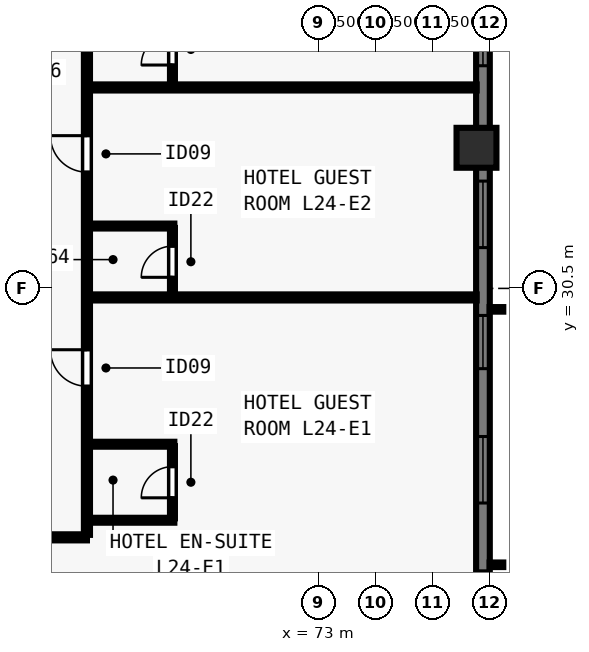
"""IFC4 building model, lengths in metres.
Left out: names, types, materials, properties, quantities, classifications, styles, units other than length and angle.
Written with IfcOpenShell. Run it as: python <this file> out.ifc"""

import sys

from ifc_helpers import new_model, si_unit, direction, frame, frame_2d, origin, origin_2d, place, context, subcontext, project, spatial, rectangle, extrude, element, fill, save


model = new_model("IFC4")
c1 = context("Model", 3, precision=1e-05, world=origin(), true_north=direction((0.0, 1.0)))
c2 = subcontext(c1, "Body", "Model", "MODEL_VIEW")
j1 = project(units=[si_unit("LENGTHUNIT", "METRE"), si_unit("PLANEANGLEUNIT", "RADIAN")], contexts=[c1])
p1 = place(None, origin())
s1 = spatial("IfcSite", under=j1, at=p1, CompositionType="ELEMENT")
p2 = place(p1, origin())
s2 = spatial("IfcBuilding", under=s1, at=p2, CompositionType="ELEMENT")
p3 = place(p2, frame((0.0, 0.0, 90.0)))
s3 = spatial("IfcBuildingStorey", under=s2, at=p3, CompositionType="ELEMENT", Elevation=90.0)
p4 = place(p3, frame((77.15, 34.2, 0.0), z_axis=(0.0, 0.0, 1.0), x_axis=(0.0, 1.0, 0.0)))
e1 = element("IfcColumn", 1, at=p4, inside=s3, PredefinedType="COLUMN", context=c2, shape_type="SweptSolid", body=[
    extrude(rectangle(XDim=1.05, YDim=1.05, at=origin_2d()), origin(), (0.0, 0.0, 1.0), 3.5),
])
p5 = place(p3, frame((77.32, 61.5, 0.0), z_axis=(0.0, 0.0, 1.0), x_axis=(0.0, -1.0, 0.0)))
e2 = element("IfcWall", 2, at=p5, inside=s3, PredefinedType="SOLIDWALL", context=c2, shape_type="SweptSolid", body=[
    extrude(rectangle(XDim=44.662, YDim=0.36, at=frame_2d((22.331, 0.0))), origin(), (0.0, 0.0, 1.0), 3.28),
])
p6 = place(p5, frame((5.68, 0.0, 0.8)))
e3 = element("IfcOpeningElement", 3, at=p6, cuts=e2, PredefinedType="OPENING", context=c2, shape_type="SweptSolid", body=[
    extrude(rectangle(XDim=1.4, YDim=1.544, at=frame_2d((0.7, 0.772))), frame((0.0, 0.19, 0.0), z_axis=(0.0, -1.0, 0.0), x_axis=(1.0, 0.0, 0.0)), (0.0, 0.0, 1.0), 0.38),
])
p7 = place(p5, frame((8.015, 0.0, 0.8)))
e4 = element("IfcOpeningElement", 4, at=p7, cuts=e2, PredefinedType="OPENING", context=c2, shape_type="SweptSolid", body=[
    extrude(rectangle(XDim=1.75, YDim=1.544, at=frame_2d((0.875, 0.772))), frame((0.0, 0.19, 0.0), z_axis=(0.0, -1.0, 0.0), x_axis=(1.0, 0.0, 0.0)), (0.0, 0.0, 1.0), 0.38),
])
p8 = place(p5, frame((11.551, 0.0, 0.8)))
e5 = element("IfcOpeningElement", 5, at=p8, cuts=e2, PredefinedType="OPENING", context=c2, shape_type="SweptSolid", body=[
    extrude(rectangle(XDim=1.4, YDim=1.544, at=frame_2d((0.7, 0.772))), frame((0.0, 0.19, 0.0), z_axis=(0.0, -1.0, 0.0), x_axis=(1.0, 0.0, 0.0)), (0.0, 0.0, 1.0), 0.38),
])
p9 = place(p5, frame((14.736, 0.0, 0.8)))
e6 = element("IfcOpeningElement", 6, at=p9, cuts=e2, PredefinedType="OPENING", context=c2, shape_type="SweptSolid", body=[
    extrude(rectangle(XDim=1.75, YDim=1.544, at=frame_2d((0.875, 0.772))), frame((0.0, 0.19, 0.0), z_axis=(0.0, -1.0, 0.0), x_axis=(1.0, 0.0, 0.0)), (0.0, 0.0, 1.0), 0.38),
])
p10 = place(p5, frame((19.521, 0.0, 0.8)))
e7 = element("IfcOpeningElement", 7, at=p10, cuts=e2, PredefinedType="OPENING", context=c2, shape_type="SweptSolid", body=[
    extrude(rectangle(XDim=1.4, YDim=1.544, at=frame_2d((0.7, 0.772))), frame((0.0, 0.19, 0.0), z_axis=(0.0, -1.0, 0.0), x_axis=(1.0, 0.0, 0.0)), (0.0, 0.0, 1.0), 0.38),
])
p11 = place(p5, frame((21.456, 0.0, 0.8)))
e8 = element("IfcOpeningElement", 8, at=p11, cuts=e2, PredefinedType="OPENING", context=c2, shape_type="SweptSolid", body=[
    extrude(rectangle(XDim=1.75, YDim=1.544, at=frame_2d((0.875, 0.772))), frame((0.0, 0.19, 0.0), z_axis=(0.0, -1.0, 0.0), x_axis=(1.0, 0.0, 0.0)), (0.0, 0.0, 1.0), 0.38),
])
p12 = place(p5, frame((23.741, 0.0, 0.8)))
e9 = element("IfcOpeningElement", 9, at=p12, cuts=e2, PredefinedType="OPENING", context=c2, shape_type="SweptSolid", body=[
    extrude(rectangle(XDim=1.4, YDim=1.544, at=frame_2d((0.7, 0.772))), frame((0.0, 0.19, 0.0), z_axis=(0.0, -1.0, 0.0), x_axis=(1.0, 0.0, 0.0)), (0.0, 0.0, 1.0), 0.38),
])
p13 = place(p5, frame((28.177, 0.0, 0.8)))
e10 = element("IfcOpeningElement", 10, at=p13, cuts=e2, PredefinedType="OPENING", context=c2, shape_type="SweptSolid", body=[
    extrude(rectangle(XDim=1.75, YDim=1.544, at=frame_2d((0.875, 0.772))), frame((0.0, 0.19, 0.0), z_axis=(0.0, -1.0, 0.0), x_axis=(1.0, 0.0, 0.0)), (0.0, 0.0, 1.0), 0.38),
])
p14 = place(p5, frame((31.711, 0.0, 0.8)))
e11 = element("IfcOpeningElement", 11, at=p14, cuts=e2, PredefinedType="OPENING", context=c2, shape_type="SweptSolid", body=[
    extrude(rectangle(XDim=1.4, YDim=1.544, at=frame_2d((0.7, 0.772))), frame((0.0, 0.19, 0.0), z_axis=(0.0, -1.0, 0.0), x_axis=(1.0, 0.0, 0.0)), (0.0, 0.0, 1.0), 0.38),
])
p15 = place(p5, frame((34.897, 0.0, 0.8)))
e12 = element("IfcOpeningElement", 12, at=p15, cuts=e2, PredefinedType="OPENING", context=c2, shape_type="SweptSolid", body=[
    extrude(rectangle(XDim=1.75, YDim=1.544, at=frame_2d((0.875, 0.772))), frame((0.0, 0.19, 0.0), z_axis=(0.0, -1.0, 0.0), x_axis=(1.0, 0.0, 0.0)), (0.0, 0.0, 1.0), 0.38),
])
p16 = place(p5, frame((38.432, 0.0, 0.8)))
e13 = element("IfcOpeningElement", 13, at=p16, cuts=e2, PredefinedType="OPENING", context=c2, shape_type="SweptSolid", body=[
    extrude(rectangle(XDim=1.4, YDim=1.544, at=frame_2d((0.7, 0.772))), frame((0.0, 0.19, 0.0), z_axis=(0.0, -1.0, 0.0), x_axis=(1.0, 0.0, 0.0)), (0.0, 0.0, 1.0), 0.38),
])
p17 = place(p3, frame((37.1, 23.95, 0.0), z_axis=(0.0, 0.0, 1.0), x_axis=(1.0, 0.0, 0.0)))
e14 = element("IfcWall", 14, at=p17, inside=s3, PredefinedType="PARTITIONING", context=c2, shape_type="SweptSolid", body=[
    extrude(rectangle(XDim=29.8, YDim=0.16, at=frame_2d((14.9, 0.0))), origin(), (0.0, 0.0, 1.0), 3.28),
])
p18 = place(p17, frame((2.571, 0.0, 0.0)))
e15 = element("IfcOpeningElement", 15, at=p18, cuts=e14, PredefinedType="OPENING", context=c2, shape_type="SweptSolid", body=[
    extrude(rectangle(XDim=0.96, YDim=2.15, at=frame_2d((0.48, 1.075))), frame((0.0, 0.09, 0.0), z_axis=(0.0, -1.0, 0.0), x_axis=(1.0, 0.0, 0.0)), (0.0, 0.0, 1.0), 0.18),
])
p19 = place(p17, frame((15.42, 0.0, 0.0)))
e16 = element("IfcOpeningElement", 16, at=p19, cuts=e14, PredefinedType="OPENING", context=c2, shape_type="SweptSolid", body=[
    extrude(rectangle(XDim=0.96, YDim=2.15, at=frame_2d((0.48, 1.075))), frame((0.0, 0.09, 0.0), z_axis=(0.0, -1.0, 0.0), x_axis=(1.0, 0.0, 0.0)), (0.0, 0.0, 1.0), 0.18),
])
p20 = place(p17, frame((27.269, 0.0, 0.0)))
e17 = element("IfcOpeningElement", 17, at=p20, cuts=e14, PredefinedType="OPENING", context=c2, shape_type="SweptSolid", body=[
    extrude(rectangle(XDim=0.96, YDim=2.15, at=frame_2d((0.48, 1.075))), frame((0.0, 0.09, 0.0), z_axis=(0.0, -1.0, 0.0), x_axis=(1.0, 0.0, 0.0)), (0.0, 0.0, 1.0), 0.18),
])
p21 = place(p3, frame((66.9, 24.015, 0.0), z_axis=(0.0, 0.0, 1.0), x_axis=(0.0, 1.0, 0.0)))
e18 = element("IfcWall", 18, at=p21, inside=s3, PredefinedType="PARTITIONING", context=c2, shape_type="SweptSolid", body=[
    extrude(rectangle(XDim=29.97, YDim=0.16, at=frame_2d((14.985, 0.0))), origin(), (0.0, 0.0, 1.0), 3.28),
])
p22 = place(p21, frame((3.911, 0.0, 0.0)))
e19 = element("IfcOpeningElement", 19, at=p22, cuts=e18, PredefinedType="OPENING", context=c2, shape_type="SweptSolid", body=[
    extrude(rectangle(XDim=0.96, YDim=2.15, at=frame_2d((0.48, 1.075))), frame((0.0, 0.09, 0.0), z_axis=(0.0, -1.0, 0.0), x_axis=(1.0, 0.0, 0.0)), (0.0, 0.0, 1.0), 0.18),
])
p23 = place(p21, frame((9.544, 0.0, 0.0)))
e20 = element("IfcOpeningElement", 20, at=p23, cuts=e18, PredefinedType="OPENING", context=c2, shape_type="SweptSolid", body=[
    extrude(rectangle(XDim=0.96, YDim=2.15, at=frame_2d((0.48, 1.075))), frame((0.0, 0.09, 0.0), z_axis=(0.0, -1.0, 0.0), x_axis=(1.0, 0.0, 0.0)), (0.0, 0.0, 1.0), 0.18),
])
p24 = place(p21, frame((15.625, 0.0, 0.0)))
e21 = element("IfcOpeningElement", 21, at=p24, cuts=e18, PredefinedType="OPENING", context=c2, shape_type="SweptSolid", body=[
    extrude(rectangle(XDim=0.96, YDim=2.15, at=frame_2d((0.48, 1.075))), frame((0.0, 0.09, 0.0), z_axis=(0.0, -1.0, 0.0), x_axis=(1.0, 0.0, 0.0)), (0.0, 0.0, 1.0), 0.18),
])
p25 = place(p21, frame((21.584, 0.0, 0.0)))
e22 = element("IfcOpeningElement", 22, at=p25, cuts=e18, PredefinedType="OPENING", context=c2, shape_type="SweptSolid", body=[
    extrude(rectangle(XDim=0.96, YDim=2.15, at=frame_2d((0.48, 1.075))), frame((0.0, 0.09, 0.0), z_axis=(0.0, -1.0, 0.0), x_axis=(1.0, 0.0, 0.0)), (0.0, 0.0, 1.0), 0.18),
])
p26 = place(p21, frame((27.494, 0.0, 0.0)))
e23 = element("IfcOpeningElement", 23, at=p26, cuts=e18, PredefinedType="OPENING", context=c2, shape_type="SweptSolid", body=[
    extrude(rectangle(XDim=0.96, YDim=2.15, at=frame_2d((0.48, 1.075))), frame((0.0, 0.09, 0.0), z_axis=(0.0, -1.0, 0.0), x_axis=(1.0, 0.0, 0.0)), (0.0, 0.0, 1.0), 0.18),
])
p27 = place(p3, frame((66.965, 24.4, 0.0), z_axis=(0.0, 0.0, 1.0), x_axis=(1.0, 0.0, 0.0)))
e24 = element("IfcWall", 24, at=p27, inside=s3, PredefinedType="PLUMBINGWALL", context=c2, shape_type="SweptSolid", body=[
    extrude(rectangle(XDim=2.235, YDim=0.13, at=frame_2d((1.117, 0.0))), origin(), (0.0, 0.0, 1.0), 2.849),
])
p28 = place(p3, frame((66.965, 26.4, 0.0), z_axis=(0.0, 0.0, 1.0), x_axis=(1.0, 0.0, 0.0)))
e25 = element("IfcWall", 25, at=p28, inside=s3, PredefinedType="PLUMBINGWALL", context=c2, shape_type="SweptSolid", body=[
    extrude(rectangle(XDim=2.235, YDim=0.13, at=frame_2d((1.117, 0.0))), origin(), (0.0, 0.0, 1.0), 3.28),
])
p29 = place(p3, frame((69.15, 24.45, 0.0), z_axis=(0.0, 0.0, 1.0), x_axis=(0.0, 1.0, 0.0)))
e26 = element("IfcWall", 26, at=p29, inside=s3, PredefinedType="PLUMBINGWALL", context=c2, shape_type="SweptSolid", body=[
    extrude(rectangle(XDim=1.9, YDim=0.13, at=frame_2d((0.95, 0.0))), origin(), (0.0, 0.0, 1.0), 3.28),
])
p30 = place(p29, frame((0.54, 0.0, 0.0)))
e27 = element("IfcOpeningElement", 27, at=p30, cuts=e26, PredefinedType="OPENING", context=c2, shape_type="SweptSolid", body=[
    extrude(rectangle(XDim=0.82, YDim=2.1, at=frame_2d((0.41, 1.05))), frame((0.0, 0.075, 0.0), z_axis=(0.0, -1.0, 0.0), x_axis=(1.0, 0.0, 0.0)), (0.0, 0.0, 1.0), 0.15),
])
p31 = place(p3, frame((66.965, 30.262, 0.0), z_axis=(0.0, 0.0, 1.0), x_axis=(1.0, 0.0, 0.0)))
e28 = element("IfcWall", 28, at=p31, inside=s3, PredefinedType="PARTITIONING", context=c2, shape_type="SweptSolid", body=[
    extrude(rectangle(XDim=10.19, YDim=0.16, at=frame_2d((5.095, 0.0))), origin(), (0.0, 0.0, 1.0), 3.28),
])
p32 = place(p3, frame((66.965, 32.141, 0.0), z_axis=(0.0, 0.0, 1.0), x_axis=(1.0, 0.0, 0.0)))
e29 = element("IfcWall", 29, at=p32, inside=s3, PredefinedType="PLUMBINGWALL", context=c2, shape_type="SweptSolid", body=[
    extrude(rectangle(XDim=2.235, YDim=0.13, at=frame_2d((1.117, 0.0))), origin(), (0.0, 0.0, 1.0), 2.439),
])
p33 = place(p3, frame((69.15, 30.327, 0.0), z_axis=(0.0, 0.0, 1.0), x_axis=(0.0, 1.0, 0.0)))
e30 = element("IfcWall", 30, at=p33, inside=s3, PredefinedType="PLUMBINGWALL", context=c2, shape_type="SweptSolid", body=[
    extrude(rectangle(XDim=1.764, YDim=0.13, at=frame_2d((0.882, 0.0))), origin(), (0.0, 0.0, 1.0), 3.28),
])
p34 = place(p33, frame((0.464, 0.0, 0.0)))
e31 = element("IfcOpeningElement", 31, at=p34, cuts=e30, PredefinedType="OPENING", context=c2, shape_type="SweptSolid", body=[
    extrude(rectangle(XDim=0.82, YDim=2.1, at=frame_2d((0.41, 1.05))), frame((0.0, 0.075, 0.0), z_axis=(0.0, -1.0, 0.0), x_axis=(1.0, 0.0, 0.0)), (0.0, 0.0, 1.0), 0.15),
])
p35 = place(p3, frame((66.965, 35.788, 0.0), z_axis=(0.0, 0.0, 1.0), x_axis=(1.0, 0.0, 0.0)))
e32 = element("IfcWall", 32, at=p35, inside=s3, PredefinedType="PARTITIONING", context=c2, shape_type="SweptSolid", body=[
    extrude(rectangle(XDim=10.19, YDim=0.16, at=frame_2d((5.095, 0.0))), origin(), (0.0, 0.0, 1.0), 3.28),
])
p36 = place(p3, frame((69.15, 35.853, 0.0), z_axis=(0.0, 0.0, 1.0), x_axis=(0.0, 1.0, 0.0)))
e33 = element("IfcWall", 33, at=p36, inside=s3, PredefinedType="PLUMBINGWALL", context=c2, shape_type="SweptSolid", body=[
    extrude(rectangle(XDim=1.885, YDim=0.13, at=frame_2d((0.942, 0.0))), origin(), (0.0, 0.0, 1.0), 3.28),
])
p37 = place(p36, frame((0.525, 0.0, 0.0)))
e34 = element("IfcOpeningElement", 34, at=p37, cuts=e33, PredefinedType="OPENING", context=c2, shape_type="SweptSolid", body=[
    extrude(rectangle(XDim=0.82, YDim=2.1, at=frame_2d((0.41, 1.05))), frame((0.0, 0.075, 0.0), z_axis=(0.0, -1.0, 0.0), x_axis=(1.0, 0.0, 0.0)), (0.0, 0.0, 1.0), 0.15),
])
p38 = place(p12, origin())
e35 = element("IfcWindow", 35, at=p38, inside=s3, PartitioningType="SINGLE_PANEL", PredefinedType="WINDOW", context=c2, shape_type="SweptSolid", body=[
    extrude(rectangle(XDim=1.4, YDim=1.544, at=frame_2d((0.7, 0.772))), frame((0.0, -0.05, 0.0), z_axis=(0.0, -1.0, 0.0), x_axis=(1.0, 0.0, 0.0)), (0.0, 0.0, 1.0), 0.06),
])
fill(e9, e35)
p39 = place(p13, origin())
e36 = element("IfcWindow", 36, at=p39, inside=s3, PartitioningType="SINGLE_PANEL", PredefinedType="WINDOW", context=c2, shape_type="SweptSolid", body=[
    extrude(rectangle(XDim=1.75, YDim=1.544, at=frame_2d((0.875, 0.772))), frame((0.0, -0.05, 0.0), z_axis=(0.0, -1.0, 0.0), x_axis=(1.0, 0.0, 0.0)), (0.0, 0.0, 1.0), 0.06),
])
fill(e10, e36)
p40 = place(p14, origin())
e37 = element("IfcWindow", 37, at=p40, inside=s3, PartitioningType="SINGLE_PANEL", PredefinedType="WINDOW", context=c2, shape_type="SweptSolid", body=[
    extrude(rectangle(XDim=1.4, YDim=1.544, at=frame_2d((0.7, 0.772))), frame((0.0, -0.05, 0.0), z_axis=(0.0, -1.0, 0.0), x_axis=(1.0, 0.0, 0.0)), (0.0, 0.0, 1.0), 0.06),
])
fill(e11, e37)
p41 = place(p15, origin())
e38 = element("IfcWindow", 38, at=p41, inside=s3, PartitioningType="SINGLE_PANEL", PredefinedType="WINDOW", context=c2, shape_type="SweptSolid", body=[
    extrude(rectangle(XDim=1.75, YDim=1.544, at=frame_2d((0.875, 0.772))), frame((0.0, -0.05, 0.0), z_axis=(0.0, -1.0, 0.0), x_axis=(1.0, 0.0, 0.0)), (0.0, 0.0, 1.0), 0.06),
])
fill(e12, e38)
p42 = place(p16, origin())
e39 = element("IfcWindow", 39, at=p42, inside=s3, PartitioningType="SINGLE_PANEL", PredefinedType="WINDOW", context=c2, shape_type="SweptSolid", body=[
    extrude(rectangle(XDim=1.4, YDim=1.544, at=frame_2d((0.7, 0.772))), frame((0.0, -0.05, 0.0), z_axis=(0.0, -1.0, 0.0), x_axis=(1.0, 0.0, 0.0)), (0.0, 0.0, 1.0), 0.06),
])
fill(e13, e39)
p43 = place(p30, origin())
e40 = element("IfcDoor", 40, at=p43, inside=s3, OperationType="SINGLE_SWING_LEFT", PredefinedType="DOOR", context=c2, shape_type="SweptSolid", body=[
    extrude(rectangle(XDim=0.82, YDim=2.1, at=frame_2d((0.41, 1.05))), frame((0.0, 0.025, 0.0), z_axis=(0.0, -1.0, 0.0), x_axis=(1.0, 0.0, 0.0)), (0.0, 0.0, 1.0), 0.05),
])
fill(e27, e40)
p44 = place(p22, origin())
e41 = element("IfcDoor", 41, at=p44, inside=s3, OperationType="SINGLE_SWING_RIGHT", PredefinedType="DOOR", context=c2, shape_type="SweptSolid", body=[
    extrude(rectangle(XDim=0.96, YDim=2.15, at=frame_2d((0.48, 1.075))), frame((0.0, 0.025, 0.0), z_axis=(0.0, -1.0, 0.0), x_axis=(1.0, 0.0, 0.0)), (0.0, 0.0, 1.0), 0.05),
])
fill(e19, e41)
p45 = place(p34, origin())
e42 = element("IfcDoor", 42, at=p45, inside=s3, OperationType="SINGLE_SWING_LEFT", PredefinedType="DOOR", context=c2, shape_type="SweptSolid", body=[
    extrude(rectangle(XDim=0.82, YDim=2.1, at=frame_2d((0.41, 1.05))), frame((0.0, 0.025, 0.0), z_axis=(0.0, -1.0, 0.0), x_axis=(1.0, 0.0, 0.0)), (0.0, 0.0, 1.0), 0.05),
])
fill(e31, e42)
p46 = place(p23, origin())
e43 = element("IfcDoor", 43, at=p46, inside=s3, OperationType="SINGLE_SWING_RIGHT", PredefinedType="DOOR", context=c2, shape_type="SweptSolid", body=[
    extrude(rectangle(XDim=0.96, YDim=2.15, at=frame_2d((0.48, 1.075))), frame((0.0, 0.025, 0.0), z_axis=(0.0, -1.0, 0.0), x_axis=(1.0, 0.0, 0.0)), (0.0, 0.0, 1.0), 0.05),
])
fill(e20, e43)
p47 = place(p37, origin())
e44 = element("IfcDoor", 44, at=p47, inside=s3, OperationType="SINGLE_SWING_LEFT", PredefinedType="DOOR", context=c2, shape_type="SweptSolid", body=[
    extrude(rectangle(XDim=0.82, YDim=2.1, at=frame_2d((0.41, 1.05))), frame((0.0, 0.025, 0.0), z_axis=(0.0, -1.0, 0.0), x_axis=(1.0, 0.0, 0.0)), (0.0, 0.0, 1.0), 0.05),
])
fill(e34, e44)
save(model, sys.argv[1])
